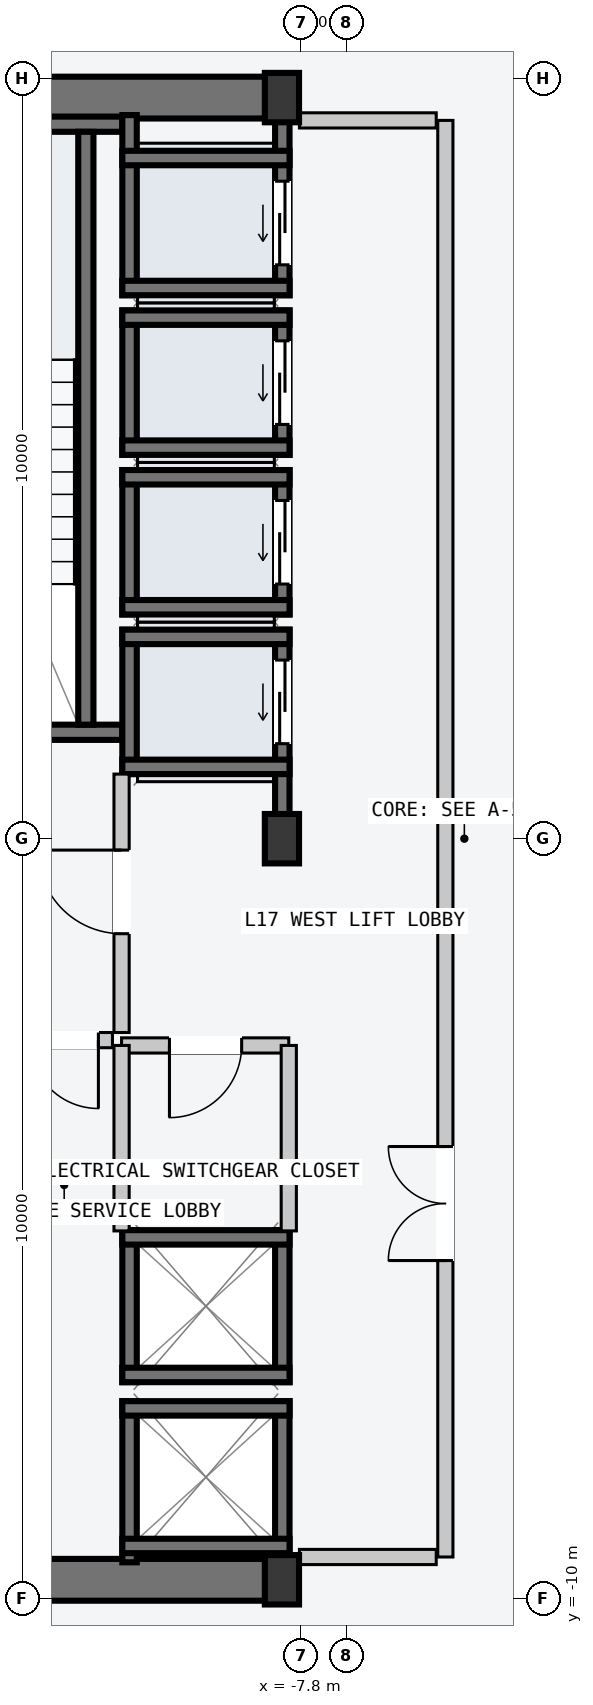
"""IFC4 building model, lengths in metres.
Left out: names, types, materials, properties, quantities, classifications, styles, units other than length and angle.
Written with IfcOpenShell. Run it as: python <this file> out.ifc"""

import sys

from ifc_helpers import new_model, si_unit, direction, frame, frame_2d, origin, origin_2d, place, context, subcontext, project, spatial, rectangle, i_section, extrude, element, fill, save


model = new_model("IFC4")
c1 = context("Model", 3, precision=1e-05, world=origin(), true_north=direction((0.0, 1.0)))
c2 = subcontext(c1, "Body", "Model", "MODEL_VIEW")
j1 = project(units=[si_unit("LENGTHUNIT", "METRE"), si_unit("PLANEANGLEUNIT", "RADIAN")], contexts=[c1])
p1 = place(None, origin())
s1 = spatial("IfcSite", under=j1, at=p1, CompositionType="ELEMENT")
p2 = place(p1, origin())
s2 = spatial("IfcBuilding", under=s1, at=p2, CompositionType="ELEMENT")
p3 = place(p2, frame((0.0, 0.0, 67.2)))
s3 = spatial("IfcBuildingStorey", under=s2, at=p3, CompositionType="ELEMENT", Elevation=67.2)
for number, where, z_axis, x_axis in (
    (1, (-14.53, -9.75, -0.2), (0.0, 0.0, 1.0), (1.0, 0.0, 0.0)),
    (2, (-14.53, 9.75, -0.2), (0.0, 0.0, 1.0), (1.0, 0.0, 0.0)),
):
    element("IfcWall", number, at=place(p3, frame(where, z_axis=z_axis, x_axis=x_axis)), inside=s3, PredefinedType="SHEAR", context=c2, shape_type="SweptSolid", body=[
        extrude(rectangle(XDim=6.46, YDim=0.55, at=frame_2d((3.23, 0.0))), origin(), (0.0, 0.0, 1.0), 3.6),
    ])
p4 = place(p3, frame((-14.25, 1.4, -0.2), z_axis=(0.0, 0.0, 1.0), x_axis=(1.0, 0.0, 0.0)))
e3 = element("IfcWall", 3, at=p4, inside=s3, PredefinedType="SOLIDWALL", context=c2, shape_type="SweptSolid", body=[
    extrude(rectangle(XDim=4.1, YDim=0.2, at=frame_2d((2.05, 0.0))), origin(), (0.0, 0.0, 1.0), 3.6),
])
p5 = place(p4, frame((1.5, 0.0, 0.2)))
e4 = element("IfcOpeningElement", 4, at=p5, cuts=e3, PredefinedType="OPENING", context=c2, shape_type="SweptSolid", body=[
    extrude(rectangle(XDim=1.12, YDim=2.18, at=frame_2d((0.56, 1.09))), frame((0.0, 0.11, 0.0), z_axis=(0.0, -1.0, 0.0), x_axis=(1.0, 0.0, 0.0)), (0.0, 0.0, 1.0), 0.22),
])
p6 = place(p3, frame((-14.25, 9.4, -0.2), z_axis=(0.0, 0.0, 1.0), x_axis=(1.0, 0.0, 0.0)))
e5 = element("IfcWall", 5, at=p6, inside=s3, PredefinedType="SOLIDWALL", context=c2, shape_type="SweptSolid", body=[
    extrude(rectangle(XDim=4.1, YDim=0.2, at=frame_2d((2.05, 0.0))), origin(), (0.0, 0.0, 1.0), 3.6),
])
p7 = place(p3, frame((-10.63, 1.5, -0.2), z_axis=(0.0, 0.0, 1.0), x_axis=(0.0, 1.0, 0.0)))
e6 = element("IfcWall", 6, at=p7, inside=s3, PredefinedType="SOLIDWALL", context=c2, shape_type="SweptSolid", body=[
    extrude(rectangle(XDim=7.8, YDim=0.2, at=frame_2d((3.9, 0.0))), origin(), (0.0, 0.0, 1.0), 3.6),
])
for number, where, z_axis, x_axis in (
    (7, (-8.05, -9.75, 0.0), (0.0, 0.0, 1.0), (1.0, 0.0, 0.0)),
    (8, (-8.05, 0.0, 0.0), (0.0, 0.0, 1.0), (1.0, 0.0, 0.0)),
    (9, (-8.05, 9.75, 0.0), (0.0, 0.0, 1.0), (1.0, 0.0, 0.0)),
):
    element("IfcColumn", number, at=place(p3, frame(where, z_axis=z_axis, x_axis=x_axis)), inside=s3, PredefinedType="COLUMN", context=c2, shape_type="SweptSolid", body=[
        extrude(i_section(OverallWidth=0.45, OverallDepth=0.65, WebThickness=0.025, FlangeThickness=0.04, at=origin_2d()), origin(), (0.0, 0.0, 1.0), 3.6),
    ])
p8 = place(p3, frame((-8.045, 0.21, -0.2), z_axis=(0.0, 0.0, 1.0), x_axis=(0.0, 1.0, 0.0)))
e10 = element("IfcWall", 10, at=p8, inside=s3, PredefinedType="SOLIDWALL", context=c2, shape_type="SweptSolid", body=[
    extrude(rectangle(XDim=2.54, YDim=0.19, at=frame_2d((1.27, 0.0))), origin(), (0.0, 0.0, 1.0), 3.6),
])
p9 = place(p8, frame((1.04, 0.0, 0.2)))
e11 = element("IfcOpeningElement", 11, at=p9, cuts=e10, PredefinedType="OPENING", context=c2, shape_type="SweptSolid", body=[
    extrude(rectangle(XDim=1.1, YDim=2.2, at=frame_2d((0.55, 1.1))), frame((0.0, 0.105, 0.0), z_axis=(0.0, -1.0, 0.0), x_axis=(1.0, 0.0, 0.0)), (0.0, 0.0, 1.0), 0.21),
])
p10 = place(p3, frame((-10.055, 0.85, -0.2), z_axis=(0.0, 0.0, 1.0), x_axis=(0.0, 1.0, 0.0)))
e12 = element("IfcWall", 12, at=p10, inside=s3, PredefinedType="SOLIDWALL", context=c2, shape_type="SweptSolid", body=[
    extrude(rectangle(XDim=1.9, YDim=0.19, at=frame_2d((0.95, 0.0))), origin(), (0.0, 0.0, 1.0), 3.6),
])
for number, where, z_axis, x_axis in (
    (13, (-10.15, 2.655, -0.2), (0.0, 0.0, 1.0), (1.0, 0.0, 0.0)),
    (14, (-10.15, 0.945, -0.2), (0.0, 0.0, 1.0), (1.0, 0.0, 0.0)),
):
    element("IfcWall", number, at=place(p3, frame(where, z_axis=z_axis, x_axis=x_axis)), inside=s3, PredefinedType="SOLIDWALL", context=c2, shape_type="SweptSolid", body=[
        extrude(rectangle(XDim=2.2, YDim=0.19, at=frame_2d((1.1, 0.0))), origin(), (0.0, 0.0, 1.0), 3.6),
    ])
p11 = place(p3, frame((-8.045, 2.95, -0.2), z_axis=(0.0, 0.0, 1.0), x_axis=(0.0, 1.0, 0.0)))
e15 = element("IfcWall", 15, at=p11, inside=s3, PredefinedType="SOLIDWALL", context=c2, shape_type="SweptSolid", body=[
    extrude(rectangle(XDim=1.9, YDim=0.19, at=frame_2d((0.95, 0.0))), origin(), (0.0, 0.0, 1.0), 3.6),
])
p12 = place(p11, frame((0.4, 0.0, 0.2)))
e16 = element("IfcOpeningElement", 16, at=p12, cuts=e15, PredefinedType="OPENING", context=c2, shape_type="SweptSolid", body=[
    extrude(rectangle(XDim=1.1, YDim=2.2, at=frame_2d((0.55, 1.1))), frame((0.0, 0.105, 0.0), z_axis=(0.0, -1.0, 0.0), x_axis=(1.0, 0.0, 0.0)), (0.0, 0.0, 1.0), 0.21),
])
p13 = place(p3, frame((-10.055, 2.95, -0.2), z_axis=(0.0, 0.0, 1.0), x_axis=(0.0, 1.0, 0.0)))
e17 = element("IfcWall", 17, at=p13, inside=s3, PredefinedType="SOLIDWALL", context=c2, shape_type="SweptSolid", body=[
    extrude(rectangle(XDim=1.9, YDim=0.19, at=frame_2d((0.95, 0.0))), origin(), (0.0, 0.0, 1.0), 3.6),
])
for number, where, z_axis, x_axis in (
    (18, (-10.15, 4.755, -0.2), (0.0, 0.0, 1.0), (1.0, 0.0, 0.0)),
    (19, (-10.15, 3.045, -0.2), (0.0, 0.0, 1.0), (1.0, 0.0, 0.0)),
):
    element("IfcWall", number, at=place(p3, frame(where, z_axis=z_axis, x_axis=x_axis)), inside=s3, PredefinedType="SOLIDWALL", context=c2, shape_type="SweptSolid", body=[
        extrude(rectangle(XDim=2.2, YDim=0.19, at=frame_2d((1.1, 0.0))), origin(), (0.0, 0.0, 1.0), 3.6),
    ])
p14 = place(p3, frame((-8.045, 5.05, -0.2), z_axis=(0.0, 0.0, 1.0), x_axis=(0.0, 1.0, 0.0)))
e20 = element("IfcWall", 20, at=p14, inside=s3, PredefinedType="SOLIDWALL", context=c2, shape_type="SweptSolid", body=[
    extrude(rectangle(XDim=1.9, YDim=0.19, at=frame_2d((0.95, 0.0))), origin(), (0.0, 0.0, 1.0), 3.6),
])
p15 = place(p14, frame((0.4, 0.0, 0.2)))
e21 = element("IfcOpeningElement", 21, at=p15, cuts=e20, PredefinedType="OPENING", context=c2, shape_type="SweptSolid", body=[
    extrude(rectangle(XDim=1.1, YDim=2.2, at=frame_2d((0.55, 1.1))), frame((0.0, 0.105, 0.0), z_axis=(0.0, -1.0, 0.0), x_axis=(1.0, 0.0, 0.0)), (0.0, 0.0, 1.0), 0.21),
])
p16 = place(p3, frame((-10.055, 5.05, -0.2), z_axis=(0.0, 0.0, 1.0), x_axis=(0.0, 1.0, 0.0)))
e22 = element("IfcWall", 22, at=p16, inside=s3, PredefinedType="SOLIDWALL", context=c2, shape_type="SweptSolid", body=[
    extrude(rectangle(XDim=1.9, YDim=0.19, at=frame_2d((0.95, 0.0))), origin(), (0.0, 0.0, 1.0), 3.6),
])
for number, where, z_axis, x_axis in (
    (23, (-10.15, 6.855, -0.2), (0.0, 0.0, 1.0), (1.0, 0.0, 0.0)),
    (24, (-10.15, 5.145, -0.2), (0.0, 0.0, 1.0), (1.0, 0.0, 0.0)),
):
    element("IfcWall", number, at=place(p3, frame(where, z_axis=z_axis, x_axis=x_axis)), inside=s3, PredefinedType="SOLIDWALL", context=c2, shape_type="SweptSolid", body=[
        extrude(rectangle(XDim=2.2, YDim=0.19, at=frame_2d((1.1, 0.0))), origin(), (0.0, 0.0, 1.0), 3.6),
    ])
p17 = place(p3, frame((-8.045, 7.15, -0.2), z_axis=(0.0, 0.0, 1.0), x_axis=(0.0, 1.0, 0.0)))
e25 = element("IfcWall", 25, at=p17, inside=s3, PredefinedType="SOLIDWALL", context=c2, shape_type="SweptSolid", body=[
    extrude(rectangle(XDim=2.37, YDim=0.19, at=frame_2d((1.185, 0.0))), origin(), (0.0, 0.0, 1.0), 3.6),
])
p18 = place(p17, frame((0.4, 0.0, 0.2)))
e26 = element("IfcOpeningElement", 26, at=p18, cuts=e25, PredefinedType="OPENING", context=c2, shape_type="SweptSolid", body=[
    extrude(rectangle(XDim=1.1, YDim=2.2, at=frame_2d((0.55, 1.1))), frame((0.0, 0.105, 0.0), z_axis=(0.0, -1.0, 0.0), x_axis=(1.0, 0.0, 0.0)), (0.0, 0.0, 1.0), 0.21),
])
p19 = place(p3, frame((-10.055, 7.15, -0.2), z_axis=(0.0, 0.0, 1.0), x_axis=(0.0, 1.0, 0.0)))
e27 = element("IfcWall", 27, at=p19, inside=s3, PredefinedType="SOLIDWALL", context=c2, shape_type="SweptSolid", body=[
    extrude(rectangle(XDim=2.37, YDim=0.19, at=frame_2d((1.185, 0.0))), origin(), (0.0, 0.0, 1.0), 3.6),
])
for number, where, z_axis, x_axis in (
    (28, (-10.15, 8.955, -0.2), (0.0, 0.0, 1.0), (1.0, 0.0, 0.0)),
    (29, (-10.15, 7.245, -0.2), (0.0, 0.0, 1.0), (1.0, 0.0, 0.0)),
):
    element("IfcWall", number, at=place(p3, frame(where, z_axis=z_axis, x_axis=x_axis)), inside=s3, PredefinedType="SOLIDWALL", context=c2, shape_type="SweptSolid", body=[
        extrude(rectangle(XDim=2.2, YDim=0.19, at=frame_2d((1.1, 0.0))), origin(), (0.0, 0.0, 1.0), 3.6),
    ])
for number, where, z_axis, x_axis in (
    (30, (-8.045, -9.52, -0.2), (0.0, 0.0, 1.0), (0.0, 1.0, 0.0)),
    (31, (-10.055, -9.52, -0.2), (0.0, 0.0, 1.0), (0.0, 1.0, 0.0)),
):
    element("IfcWall", number, at=place(p3, frame(where, z_axis=z_axis, x_axis=x_axis)), inside=s3, PredefinedType="SOLIDWALL", context=c2, shape_type="SweptSolid", body=[
        extrude(rectangle(XDim=2.12, YDim=0.19, at=frame_2d((1.06, 0.0))), origin(), (0.0, 0.0, 1.0), 3.6),
    ])
for number, where, z_axis, x_axis in (
    (32, (-10.15, -7.495, -0.2), (0.0, 0.0, 1.0), (1.0, 0.0, 0.0)),
    (33, (-10.15, -9.305, -0.2), (0.0, 0.0, 1.0), (1.0, 0.0, 0.0)),
):
    element("IfcWall", number, at=place(p3, frame(where, z_axis=z_axis, x_axis=x_axis)), inside=s3, PredefinedType="SOLIDWALL", context=c2, shape_type="SweptSolid", body=[
        extrude(rectangle(XDim=2.2, YDim=0.19, at=frame_2d((1.1, 0.0))), origin(), (0.0, 0.0, 1.0), 3.6),
    ])
for number, where, z_axis, x_axis in (
    (34, (-8.045, -7.15, -0.2), (0.0, 0.0, 1.0), (0.0, 1.0, 0.0)),
    (35, (-10.055, -7.15, -0.2), (0.0, 0.0, 1.0), (0.0, 1.0, 0.0)),
):
    element("IfcWall", number, at=place(p3, frame(where, z_axis=z_axis, x_axis=x_axis)), inside=s3, PredefinedType="SOLIDWALL", context=c2, shape_type="SweptSolid", body=[
        extrude(rectangle(XDim=2.0, YDim=0.19, at=frame_2d((1.0, 0.0))), origin(), (0.0, 0.0, 1.0), 3.6),
    ])
for number, where, z_axis, x_axis in (
    (36, (-10.15, -5.245, -0.2), (0.0, 0.0, 1.0), (1.0, 0.0, 0.0)),
    (37, (-10.15, -7.055, -0.2), (0.0, 0.0, 1.0), (1.0, 0.0, 0.0)),
):
    element("IfcWall", number, at=place(p3, frame(where, z_axis=z_axis, x_axis=x_axis)), inside=s3, PredefinedType="SOLIDWALL", context=c2, shape_type="SweptSolid", body=[
        extrude(rectangle(XDim=2.2, YDim=0.19, at=frame_2d((1.1, 0.0))), origin(), (0.0, 0.0, 1.0), 3.6),
    ])
p20 = place(p3, frame((-5.9, -9.45, 0.0), z_axis=(0.0, 0.0, 1.0), x_axis=(0.0, 1.0, 0.0)))
e38 = element("IfcWall", 38, at=p20, inside=s3, PredefinedType="PARTITIONING", context=c2, shape_type="SweptSolid", body=[
    extrude(rectangle(XDim=18.9, YDim=0.2, at=frame_2d((9.45, 0.0))), origin(), (0.0, 0.0, 1.0), 3.4),
])
p21 = place(p20, frame((3.9, 0.0, 0.0)))
e39 = element("IfcOpeningElement", 39, at=p21, cuts=e38, PredefinedType="OPENING", context=c2, shape_type="SweptSolid", body=[
    extrude(rectangle(XDim=1.5, YDim=2.2, at=frame_2d((0.75, 1.1))), frame((0.0, 0.11, 0.0), z_axis=(0.0, -1.0, 0.0), x_axis=(1.0, 0.0, 0.0)), (0.0, 0.0, 1.0), 0.22),
])
for number, where, z_axis, x_axis in (
    (40, (-6.02, -9.45, 0.0), (0.0, 0.0, 1.0), (-1.0, 0.0, 0.0)),
    (41, (-6.02, 9.45, 0.0), (0.0, 0.0, 1.0), (-1.0, 0.0, 0.0)),
):
    element("IfcWall", number, at=place(p3, frame(where, z_axis=z_axis, x_axis=x_axis)), inside=s3, PredefinedType="PARTITIONING", context=c2, shape_type="SweptSolid", body=[
        extrude(rectangle(XDim=1.8, YDim=0.2, at=frame_2d((0.9, 0.0))), origin(), (0.0, 0.0, 1.0), 3.4),
    ])
p22 = place(p3, frame((-10.16, -2.55, 0.0), z_axis=(0.0, 0.0, 1.0), x_axis=(0.0, 1.0, 0.0)))
e42 = element("IfcWall", 42, at=p22, inside=s3, PredefinedType="PARTITIONING", context=c2, shape_type="SweptSolid", body=[
    extrude(rectangle(XDim=3.4, YDim=0.2, at=frame_2d((1.7, 0.0))), origin(), (0.0, 0.0, 1.0), 3.4),
])
p23 = place(p22, frame((1.3, 0.0, 0.0)))
e43 = element("IfcOpeningElement", 43, at=p23, cuts=e42, PredefinedType="OPENING", context=c2, shape_type="SweptSolid", body=[
    extrude(rectangle(XDim=1.1, YDim=2.15, at=frame_2d((0.55, 1.075))), frame((0.0, 0.11, 0.0), z_axis=(0.0, -1.0, 0.0), x_axis=(1.0, 0.0, 0.0)), (0.0, 0.0, 1.0), 0.22),
])
p24 = place(p3, frame((-10.28, -2.65, 0.0), z_axis=(0.0, 0.0, 1.0), x_axis=(-1.0, 0.0, 0.0)))
e44 = element("IfcWall", 44, at=p24, inside=s3, PredefinedType="PARTITIONING", context=c2, shape_type="SweptSolid", body=[
    extrude(rectangle(XDim=1.27, YDim=0.2, at=frame_2d((0.635, 0.0))), origin(), (0.0, 0.0, 1.0), 3.4),
])
p25 = place(p24, frame((0.185, 0.0, 0.0)))
e45 = element("IfcOpeningElement", 45, at=p25, cuts=e44, PredefinedType="OPENING", context=c2, shape_type="SweptSolid", body=[
    extrude(rectangle(XDim=0.9, YDim=2.15, at=frame_2d((0.45, 1.075))), frame((0.0, 0.11, 0.0), z_axis=(0.0, -1.0, 0.0), x_axis=(1.0, 0.0, 0.0)), (0.0, 0.0, 1.0), 0.22),
])
p26 = place(p3, frame((-7.96, -2.72, 0.0), z_axis=(0.0, 0.0, 1.0), x_axis=(-1.0, 0.0, 0.0)))
e46 = element("IfcWall", 46, at=p26, inside=s3, PredefinedType="PARTITIONING", context=c2, shape_type="SweptSolid", body=[
    extrude(rectangle(XDim=2.2, YDim=0.2, at=frame_2d((1.1, 0.0))), origin(), (0.0, 0.0, 1.0), 3.4),
])
p27 = place(p26, frame((0.62, 0.0, 0.0)))
e47 = element("IfcOpeningElement", 47, at=p27, cuts=e46, PredefinedType="OPENING", context=c2, shape_type="SweptSolid", body=[
    extrude(rectangle(XDim=0.95, YDim=2.1, at=frame_2d((0.475, 1.05))), frame((0.0, 0.11, 0.0), z_axis=(0.0, -1.0, 0.0), x_axis=(1.0, 0.0, 0.0)), (0.0, 0.0, 1.0), 0.22),
])
for number, where, z_axis, x_axis in (
    (48, (-7.96, -5.16, 0.0), (0.0, 0.0, 1.0), (0.0, 1.0, 0.0)),
    (49, (-10.16, -5.16, 0.0), (0.0, 0.0, 1.0), (0.0, 1.0, 0.0)),
):
    element("IfcWall", number, at=place(p3, frame(where, z_axis=z_axis, x_axis=x_axis)), inside=s3, PredefinedType="PARTITIONING", context=c2, shape_type="SweptSolid", body=[
        extrude(rectangle(XDim=2.44, YDim=0.2, at=frame_2d((1.22, 0.0))), origin(), (0.0, 0.0, 1.0), 3.4),
    ])
p28 = place(p9, origin())
e50 = element("IfcDoor", 50, at=p28, inside=s3, OperationType="SLIDING_TO_LEFT", PredefinedType="DOOR", context=c2, shape_type="SweptSolid", body=[
    extrude(rectangle(XDim=1.1, YDim=2.2, at=frame_2d((0.55, 1.1))), frame((0.0, 0.025, 0.0), z_axis=(0.0, -1.0, 0.0), x_axis=(1.0, 0.0, 0.0)), (0.0, 0.0, 1.0), 0.05),
])
fill(e11, e50)
p29 = place(p12, origin())
e51 = element("IfcDoor", 51, at=p29, inside=s3, OperationType="SLIDING_TO_LEFT", PredefinedType="DOOR", context=c2, shape_type="SweptSolid", body=[
    extrude(rectangle(XDim=1.1, YDim=2.2, at=frame_2d((0.55, 1.1))), frame((0.0, 0.025, 0.0), z_axis=(0.0, -1.0, 0.0), x_axis=(1.0, 0.0, 0.0)), (0.0, 0.0, 1.0), 0.05),
])
fill(e16, e51)
p30 = place(p15, origin())
e52 = element("IfcDoor", 52, at=p30, inside=s3, OperationType="SLIDING_TO_LEFT", PredefinedType="DOOR", context=c2, shape_type="SweptSolid", body=[
    extrude(rectangle(XDim=1.1, YDim=2.2, at=frame_2d((0.55, 1.1))), frame((0.0, 0.025, 0.0), z_axis=(0.0, -1.0, 0.0), x_axis=(1.0, 0.0, 0.0)), (0.0, 0.0, 1.0), 0.05),
])
fill(e21, e52)
p31 = place(p18, origin())
e53 = element("IfcDoor", 53, at=p31, inside=s3, OperationType="SLIDING_TO_LEFT", PredefinedType="DOOR", context=c2, shape_type="SweptSolid", body=[
    extrude(rectangle(XDim=1.1, YDim=2.2, at=frame_2d((0.55, 1.1))), frame((0.0, 0.025, 0.0), z_axis=(0.0, -1.0, 0.0), x_axis=(1.0, 0.0, 0.0)), (0.0, 0.0, 1.0), 0.05),
])
fill(e26, e53)
p32 = place(p21, origin())
e54 = element("IfcDoor", 54, at=p32, inside=s3, OperationType="DOUBLE_DOOR_SINGLE_SWING", PredefinedType="DOOR", context=c2, shape_type="SweptSolid", body=[
    extrude(rectangle(XDim=1.5, YDim=2.2, at=frame_2d((0.75, 1.1))), frame((0.0, 0.025, 0.0), z_axis=(0.0, -1.0, 0.0), x_axis=(1.0, 0.0, 0.0)), (0.0, 0.0, 1.0), 0.05),
])
fill(e39, e54)
p33 = place(p23, origin())
e55 = element("IfcDoor", 55, at=p33, inside=s3, OperationType="SINGLE_SWING_RIGHT", PredefinedType="DOOR", context=c2, shape_type="SweptSolid", body=[
    extrude(rectangle(XDim=1.1, YDim=2.15, at=frame_2d((0.55, 1.075))), frame((0.0, 0.025, 0.0), z_axis=(0.0, -1.0, 0.0), x_axis=(1.0, 0.0, 0.0)), (0.0, 0.0, 1.0), 0.05),
])
fill(e43, e55)
p34 = place(p25, origin())
e56 = element("IfcDoor", 56, at=p34, inside=s3, OperationType="SINGLE_SWING_LEFT", PredefinedType="DOOR", context=c2, shape_type="SweptSolid", body=[
    extrude(rectangle(XDim=0.9, YDim=2.15, at=frame_2d((0.45, 1.075))), frame((0.0, 0.025, 0.0), z_axis=(0.0, -1.0, 0.0), x_axis=(1.0, 0.0, 0.0)), (0.0, 0.0, 1.0), 0.05),
])
fill(e45, e56)
p35 = place(p27, origin())
e57 = element("IfcDoor", 57, at=p35, inside=s3, OperationType="SINGLE_SWING_RIGHT", PredefinedType="DOOR", context=c2, shape_type="SweptSolid", body=[
    extrude(rectangle(XDim=0.95, YDim=2.1, at=frame_2d((0.475, 1.05))), frame((0.0, 0.025, 0.0), z_axis=(0.0, -1.0, 0.0), x_axis=(1.0, 0.0, 0.0)), (0.0, 0.0, 1.0), 0.05),
])
fill(e47, e57)
save(model, sys.argv[1])
